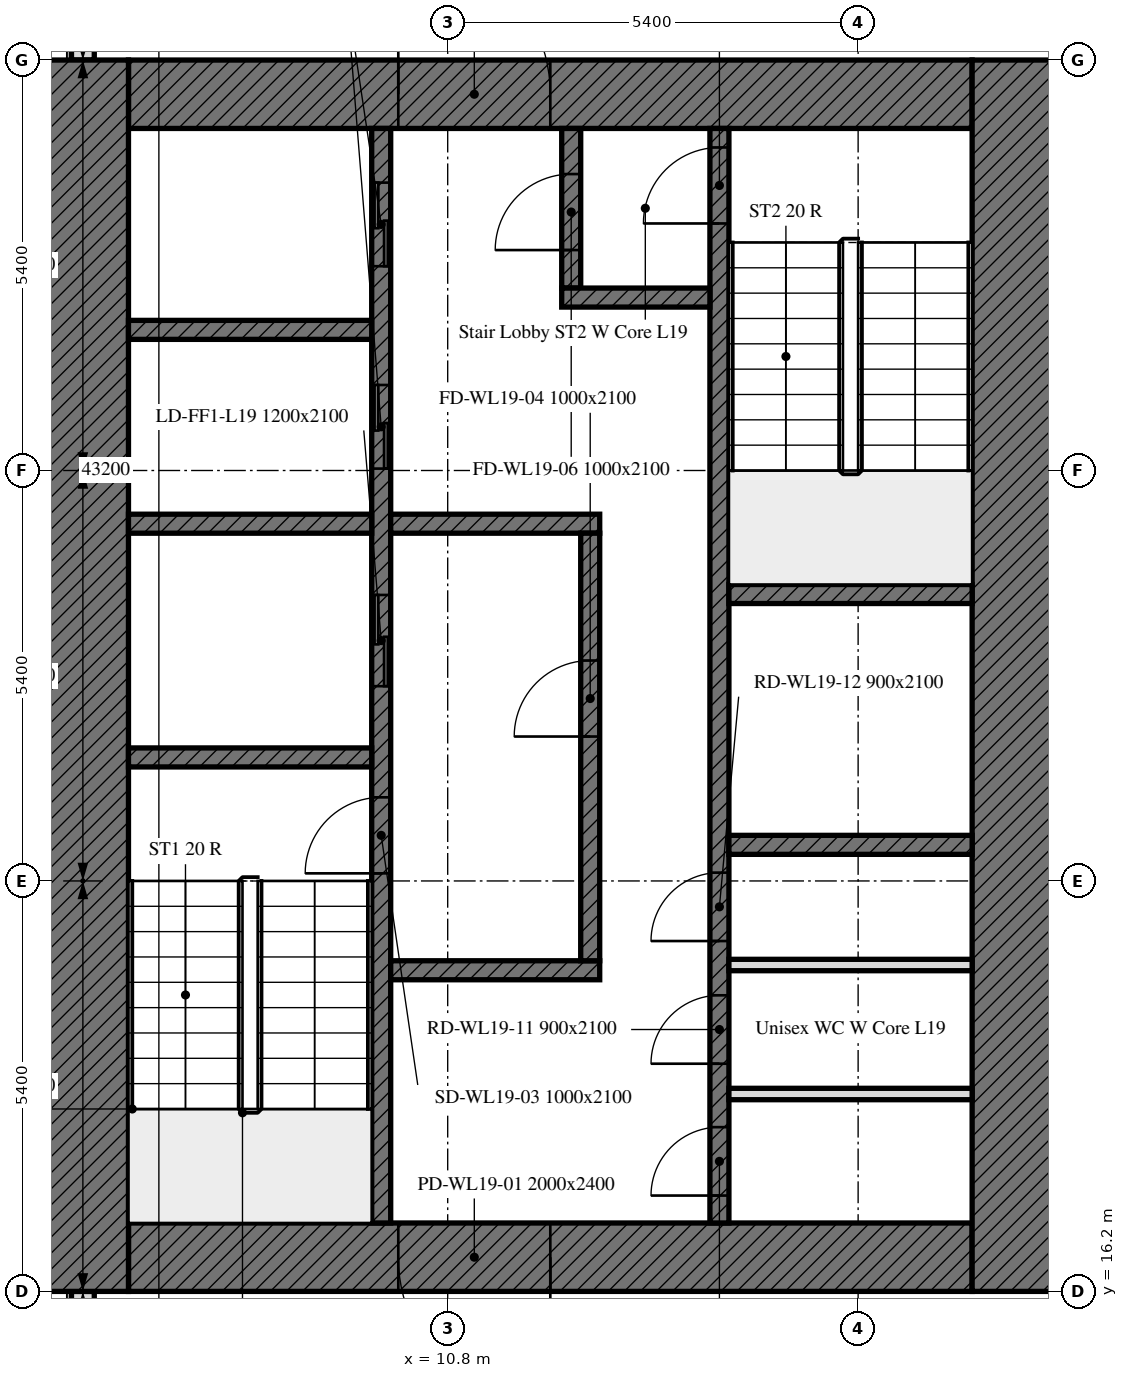
"""IFC4 building model, lengths in metres.
Left out: names, types, materials, properties, quantities, classifications, styles, units other than length and angle.
Written with IfcOpenShell. Run it as: python <this file> out.ifc"""

import sys

from ifc_helpers import new_model, si_unit, direction, frame, frame_2d, origin, place, context, subcontext, project, spatial, rectangle, extrude, element, fill, save


model = new_model("IFC4")
c1 = context("Model", 3, precision=1e-05, world=origin(), true_north=direction((0.0, 1.0)))
c2 = subcontext(c1, "Body", "Model", "MODEL_VIEW")
j1 = project(units=[si_unit("LENGTHUNIT", "METRE"), si_unit("PLANEANGLEUNIT", "RADIAN")], contexts=[c1])
p1 = place(None, origin())
s1 = spatial("IfcSite", under=j1, at=p1, CompositionType="ELEMENT")
p2 = place(p1, origin())
s2 = spatial("IfcBuilding", under=s1, at=p2, CompositionType="ELEMENT")
p3 = place(p2, frame((0.0, 0.0, 84.0)))
s3 = spatial("IfcBuildingStorey", under=s2, at=p3, CompositionType="ELEMENT", Elevation=84.0)
p4 = place(p3, frame((6.0, 43.014, 0.0), z_axis=(0.0, 0.0, 1.0), x_axis=(0.0, -1.0, 0.0)))
e1 = element("IfcWall", 1, at=p4, inside=s3, PredefinedType="SOLIDWALL", context=c2, shape_type="SweptSolid", body=[
    extrude(rectangle(XDim=10.614, YDim=0.3, at=frame_2d((5.307, 0.0))), origin(), (0.0, 0.0, 1.0), 3.5),
])
p5 = place(p4, frame((6.564, 0.0, 0.9)))
e2 = element("IfcOpeningElement", 2, at=p5, cuts=e1, PredefinedType="OPENING", context=c2, shape_type="SweptSolid", body=[
    extrude(rectangle(XDim=1.1, YDim=1.7, at=frame_2d((0.55, 0.85))), frame((0.0, 0.16, 0.0), z_axis=(0.0, -1.0, 0.0), x_axis=(1.0, 0.0, 0.0)), (0.0, 0.0, 1.0), 0.32),
])
p6 = place(p4, frame((8.164, 0.0, 0.9)))
e3 = element("IfcOpeningElement", 3, at=p6, cuts=e1, PredefinedType="OPENING", context=c2, shape_type="SweptSolid", body=[
    extrude(rectangle(XDim=1.1, YDim=1.7, at=frame_2d((0.55, 0.85))), frame((0.0, 0.16, 0.0), z_axis=(0.0, -1.0, 0.0), x_axis=(1.0, 0.0, 0.0)), (0.0, 0.0, 1.0), 0.32),
])
p7 = place(p3, frame((6.0, 16.2, 0.0), z_axis=(0.0, 0.0, 1.0), x_axis=(0.0, -1.0, 0.0)))
e4 = element("IfcWall", 4, at=p7, inside=s3, PredefinedType="SOLIDWALL", context=c2, shape_type="SweptSolid", body=[
    extrude(rectangle(XDim=5.214, YDim=0.3, at=frame_2d((2.607, 0.0))), origin(), (0.0, 0.0, 1.0), 3.5),
])
p8 = place(p7, frame((1.35, 0.0, 0.9)))
e5 = element("IfcOpeningElement", 5, at=p8, cuts=e4, PredefinedType="OPENING", context=c2, shape_type="SweptSolid", body=[
    extrude(rectangle(XDim=1.1, YDim=1.7, at=frame_2d((0.55, 0.85))), frame((0.0, 0.16, 0.0), z_axis=(0.0, -1.0, 0.0), x_axis=(1.0, 0.0, 0.0)), (0.0, 0.0, 1.0), 0.32),
])
p9 = place(p7, frame((2.95, 0.0, 0.9)))
e6 = element("IfcOpeningElement", 6, at=p9, cuts=e4, PredefinedType="OPENING", context=c2, shape_type="SweptSolid", body=[
    extrude(rectangle(XDim=1.1, YDim=1.7, at=frame_2d((0.55, 0.85))), frame((0.0, 0.16, 0.0), z_axis=(0.0, -1.0, 0.0), x_axis=(1.0, 0.0, 0.0)), (0.0, 0.0, 1.0), 0.32),
])
p10 = place(p3, frame((17.7, 16.65, 0.0), z_axis=(0.0, 0.0, 1.0), x_axis=(-1.0, 0.0, 0.0)))
e7 = element("IfcWall", 7, at=p10, inside=s3, PredefinedType="SOLIDWALL", context=c2, shape_type="SweptSolid", body=[
    extrude(rectangle(XDim=11.1, YDim=0.9, at=frame_2d((5.55, 0.0))), origin(), (0.0, 0.0, 1.0), 3.5),
])
p11 = place(p10, frame((5.55, 0.0, 0.0)))
e8 = element("IfcOpeningElement", 8, at=p11, cuts=e7, PredefinedType="OPENING", context=c2, shape_type="SweptSolid", body=[
    extrude(rectangle(XDim=2.0, YDim=2.4, at=frame_2d((1.0, 1.2))), frame((0.0, 0.45, 0.0), z_axis=(0.0, -1.0, 0.0), x_axis=(1.0, 0.0, 0.0)), (0.0, 0.0, 1.0), 0.9),
])
p12 = place(p3, frame((6.6, 31.95, 0.0), z_axis=(0.0, 0.0, 1.0), x_axis=(1.0, 0.0, 0.0)))
e9 = element("IfcWall", 9, at=p12, inside=s3, PredefinedType="SOLIDWALL", context=c2, shape_type="SweptSolid", body=[
    extrude(rectangle(XDim=11.1, YDim=0.9, at=frame_2d((5.55, 0.0))), origin(), (0.0, 0.0, 1.0), 3.5),
])
p13 = place(p12, frame((3.55, 0.0, 0.0)))
e10 = element("IfcOpeningElement", 10, at=p13, cuts=e9, PredefinedType="OPENING", context=c2, shape_type="SweptSolid", body=[
    extrude(rectangle(XDim=2.0, YDim=2.4, at=frame_2d((1.0, 1.2))), frame((0.0, 0.45, 0.0), z_axis=(0.0, -1.0, 0.0), x_axis=(1.0, 0.0, 0.0)), (0.0, 0.0, 1.0), 0.9),
])
for number, where, z_axis, x_axis in (
    (11, (6.0, 16.2, 0.0), (0.0, 0.0, 1.0), (0.0, 1.0, 0.0)),
    (12, (18.3, 32.4, 0.0), (0.0, 0.0, 1.0), (0.0, -1.0, 0.0)),
):
    element("IfcWall", number, at=place(p3, frame(where, z_axis=z_axis, x_axis=x_axis)), inside=s3, PredefinedType="SOLIDWALL", context=c2, shape_type="SweptSolid", body=[
        extrude(rectangle(XDim=16.2, YDim=1.2, at=frame_2d((8.1, 0.0))), origin(), (0.0, 0.0, 1.0), 3.5),
    ])
p14 = place(p3, frame((9.925, 17.1, 0.0), z_axis=(0.0, 0.0, 1.0), x_axis=(0.0, 1.0, 0.0)))
e13 = element("IfcWall", 13, at=p14, inside=s3, PredefinedType="SOLIDWALL", context=c2, shape_type="SweptSolid", body=[
    extrude(rectangle(XDim=14.4, YDim=0.25, at=frame_2d((7.2, 0.0))), origin(), (0.0, 0.0, 1.0), 3.5),
])
p15 = place(p14, frame((4.6, 0.0, 0.0)))
e14 = element("IfcOpeningElement", 14, at=p15, cuts=e13, PredefinedType="OPENING", context=c2, shape_type="SweptSolid", body=[
    extrude(rectangle(XDim=1.0, YDim=2.1, at=frame_2d((0.5, 1.05))), frame((0.0, 0.125, 0.0), z_axis=(0.0, -1.0, 0.0), x_axis=(1.0, 0.0, 0.0)), (0.0, 0.0, 1.0), 0.25),
])
p16 = place(p14, frame((7.062, 0.0, 0.0)))
e15 = element("IfcOpeningElement", 15, at=p16, cuts=e13, PredefinedType="OPENING", context=c2, shape_type="SweptSolid", body=[
    extrude(rectangle(XDim=1.2, YDim=2.1, at=frame_2d((0.6, 1.05))), frame((0.0, 0.125, 0.0), z_axis=(0.0, -1.0, 0.0), x_axis=(1.0, 0.0, 0.0)), (0.0, 0.0, 1.0), 0.25),
])
p17 = place(p14, frame((9.925, 0.0, 0.0)))
e16 = element("IfcOpeningElement", 16, at=p17, cuts=e13, PredefinedType="OPENING", context=c2, shape_type="SweptSolid", body=[
    extrude(rectangle(XDim=1.1, YDim=2.1, at=frame_2d((0.55, 1.05))), frame((0.0, 0.125, 0.0), z_axis=(0.0, -1.0, 0.0), x_axis=(1.0, 0.0, 0.0)), (0.0, 0.0, 1.0), 0.25),
])
p18 = place(p14, frame((12.587, 0.0, 0.0)))
e17 = element("IfcOpeningElement", 17, at=p18, cuts=e13, PredefinedType="OPENING", context=c2, shape_type="SweptSolid", body=[
    extrude(rectangle(XDim=1.1, YDim=2.1, at=frame_2d((0.55, 1.05))), frame((0.0, 0.125, 0.0), z_axis=(0.0, -1.0, 0.0), x_axis=(1.0, 0.0, 0.0)), (0.0, 0.0, 1.0), 0.25),
])
p19 = place(p3, frame((14.375, 17.1, 0.0), z_axis=(0.0, 0.0, 1.0), x_axis=(0.0, 1.0, 0.0)))
e18 = element("IfcWall", 18, at=p19, inside=s3, PredefinedType="SOLIDWALL", context=c2, shape_type="SweptSolid", body=[
    extrude(rectangle(XDim=14.4, YDim=0.25, at=frame_2d((7.2, 0.0))), origin(), (0.0, 0.0, 1.0), 3.5),
])
p20 = place(p19, frame((13.15, 0.0, 0.0)))
e19 = element("IfcOpeningElement", 19, at=p20, cuts=e18, PredefinedType="OPENING", context=c2, shape_type="SweptSolid", body=[
    extrude(rectangle(XDim=1.0, YDim=2.1, at=frame_2d((0.5, 1.05))), frame((0.0, 0.125, 0.0), z_axis=(0.0, -1.0, 0.0), x_axis=(1.0, 0.0, 0.0)), (0.0, 0.0, 1.0), 0.25),
])
p21 = place(p19, frame((0.361, 0.0, 0.0)))
e20 = element("IfcOpeningElement", 20, at=p21, cuts=e18, PredefinedType="OPENING", context=c2, shape_type="SweptSolid", body=[
    extrude(rectangle(XDim=0.9, YDim=2.1, at=frame_2d((0.45, 1.05))), frame((0.0, 0.125, 0.0), z_axis=(0.0, -1.0, 0.0), x_axis=(1.0, 0.0, 0.0)), (0.0, 0.0, 1.0), 0.25),
])
p22 = place(p19, frame((2.095, 0.0, 0.0)))
e21 = element("IfcOpeningElement", 21, at=p22, cuts=e18, PredefinedType="OPENING", context=c2, shape_type="SweptSolid", body=[
    extrude(rectangle(XDim=0.9, YDim=2.1, at=frame_2d((0.45, 1.05))), frame((0.0, 0.125, 0.0), z_axis=(0.0, -1.0, 0.0), x_axis=(1.0, 0.0, 0.0)), (0.0, 0.0, 1.0), 0.25),
])
p23 = place(p19, frame((3.709, 0.0, 0.0)))
e22 = element("IfcOpeningElement", 22, at=p23, cuts=e18, PredefinedType="OPENING", context=c2, shape_type="SweptSolid", body=[
    extrude(rectangle(XDim=0.9, YDim=2.1, at=frame_2d((0.45, 1.05))), frame((0.0, 0.125, 0.0), z_axis=(0.0, -1.0, 0.0), x_axis=(1.0, 0.0, 0.0)), (0.0, 0.0, 1.0), 0.25),
])
for number, where, z_axis, x_axis in (
    (23, (6.6, 23.225, 0.0), (0.0, 0.0, 1.0), (1.0, 0.0, 0.0)),
    (24, (14.5, 25.375, 0.0), (0.0, 0.0, 1.0), (1.0, 0.0, 0.0)),
    (25, (14.5, 22.075, 0.0), (0.0, 0.0, 1.0), (1.0, 0.0, 0.0)),
    (26, (6.6, 26.3, 0.0), (0.0, 0.0, 1.0), (1.0, 0.0, 0.0)),
):
    element("IfcWall", number, at=place(p3, frame(where, z_axis=z_axis, x_axis=x_axis)), inside=s3, PredefinedType="SOLIDWALL", context=c2, shape_type="SweptSolid", body=[
        extrude(rectangle(XDim=3.2, YDim=0.25, at=frame_2d((1.6, 0.0))), origin(), (0.0, 0.0, 1.0), 3.5),
    ])
for number, where, z_axis, x_axis in (
    (27, (10.05, 26.3, 0.0), (0.0, 0.0, 1.0), (1.0, 0.0, 0.0)),
    (28, (10.05, 20.425, 0.0), (0.0, 0.0, 1.0), (1.0, 0.0, 0.0)),
):
    element("IfcWall", number, at=place(p3, frame(where, z_axis=z_axis, x_axis=x_axis)), inside=s3, PredefinedType="SOLIDWALL", context=c2, shape_type="SweptSolid", body=[
        extrude(rectangle(XDim=2.75, YDim=0.25, at=frame_2d((1.375, 0.0))), origin(), (0.0, 0.0, 1.0), 3.5),
    ])
p24 = place(p3, frame((12.425, 29.4, 0.0), z_axis=(0.0, 0.0, 1.0), x_axis=(0.0, 1.0, 0.0)))
e29 = element("IfcWall", 29, at=p24, inside=s3, PredefinedType="SOLIDWALL", context=c2, shape_type="SweptSolid", body=[
    extrude(rectangle(XDim=2.1, YDim=0.25, at=frame_2d((1.05, 0.0))), origin(), (0.0, 0.0, 1.0), 3.5),
])
p25 = place(p24, frame((0.5, 0.0, 0.0)))
e30 = element("IfcOpeningElement", 30, at=p25, cuts=e29, PredefinedType="OPENING", context=c2, shape_type="SweptSolid", body=[
    extrude(rectangle(XDim=1.0, YDim=2.1, at=frame_2d((0.5, 1.05))), frame((0.0, 0.125, 0.0), z_axis=(0.0, -1.0, 0.0), x_axis=(1.0, 0.0, 0.0)), (0.0, 0.0, 1.0), 0.25),
])
p26 = place(p3, frame((12.3, 29.275, 0.0), z_axis=(0.0, 0.0, 1.0), x_axis=(1.0, 0.0, 0.0)))
e31 = element("IfcWall", 31, at=p26, inside=s3, PredefinedType="SOLIDWALL", context=c2, shape_type="SweptSolid", body=[
    extrude(rectangle(XDim=1.95, YDim=0.25, at=frame_2d((0.975, 0.0))), origin(), (0.0, 0.0, 1.0), 3.5),
])
p27 = place(p3, frame((12.675, 20.55, 0.0), z_axis=(0.0, 0.0, 1.0), x_axis=(0.0, 1.0, 0.0)))
e32 = element("IfcWall", 32, at=p27, inside=s3, PredefinedType="SOLIDWALL", context=c2, shape_type="SweptSolid", body=[
    extrude(rectangle(XDim=5.625, YDim=0.25, at=frame_2d((2.812, 0.0))), origin(), (0.0, 0.0, 1.0), 3.5),
])
p28 = place(p27, frame((2.95, 0.0, 0.0)))
e33 = element("IfcOpeningElement", 33, at=p28, cuts=e32, PredefinedType="OPENING", context=c2, shape_type="SweptSolid", body=[
    extrude(rectangle(XDim=1.0, YDim=2.1, at=frame_2d((0.5, 1.05))), frame((0.0, 0.125, 0.0), z_axis=(0.0, -1.0, 0.0), x_axis=(1.0, 0.0, 0.0)), (0.0, 0.0, 1.0), 0.25),
])
p29 = place(p3, frame((6.6, 28.85, 0.0), z_axis=(0.0, 0.0, 1.0), x_axis=(1.0, 0.0, 0.0)))
e34 = element("IfcWall", 34, at=p29, inside=s3, PredefinedType="SOLIDWALL", context=c2, shape_type="SweptSolid", body=[
    extrude(rectangle(XDim=3.2, YDim=0.25, at=frame_2d((1.6, 0.0))), origin(), (0.0, 0.0, 1.0), 3.5),
])
for number, where, z_axis, x_axis in (
    (35, (14.5, 18.797, 0.0), (0.0, 0.0, 1.0), (1.0, 0.0, 0.0)),
    (36, (14.5, 20.494, 0.0), (0.0, 0.0, 1.0), (1.0, 0.0, 0.0)),
):
    element("IfcWall", number, at=place(p3, frame(where, z_axis=z_axis, x_axis=x_axis)), inside=s3, PredefinedType="PARTITIONING", context=c2, shape_type="SweptSolid", body=[
        extrude(rectangle(XDim=3.2, YDim=0.15, at=frame_2d((1.6, 0.0))), origin(), (0.0, 0.0, 1.0), 3.5),
    ])
p30 = place(p11, origin())
e37 = element("IfcDoor", 37, at=p30, inside=s3, OperationType="DOUBLE_DOOR_SINGLE_SWING", PredefinedType="DOOR", context=c2, shape_type="SweptSolid", body=[
    extrude(rectangle(XDim=2.0, YDim=2.4, at=frame_2d((1.0, 1.2))), frame((0.0, 0.025, 0.0), z_axis=(0.0, -1.0, 0.0), x_axis=(1.0, 0.0, 0.0)), (0.0, 0.0, 1.0), 0.05),
])
fill(e8, e37)
p31 = place(p13, origin())
e38 = element("IfcDoor", 38, at=p31, inside=s3, OperationType="DOUBLE_DOOR_SINGLE_SWING", PredefinedType="DOOR", context=c2, shape_type="SweptSolid", body=[
    extrude(rectangle(XDim=2.0, YDim=2.4, at=frame_2d((1.0, 1.2))), frame((0.0, 0.025, 0.0), z_axis=(0.0, -1.0, 0.0), x_axis=(1.0, 0.0, 0.0)), (0.0, 0.0, 1.0), 0.05),
])
fill(e10, e38)
p32 = place(p15, origin())
e39 = element("IfcDoor", 39, at=p32, inside=s3, OperationType="SINGLE_SWING_LEFT", PredefinedType="DOOR", context=c2, shape_type="SweptSolid", body=[
    extrude(rectangle(XDim=1.0, YDim=2.1, at=frame_2d((0.5, 1.05))), frame((0.0, 0.025, 0.0), z_axis=(0.0, -1.0, 0.0), x_axis=(1.0, 0.0, 0.0)), (0.0, 0.0, 1.0), 0.05),
])
fill(e14, e39)
p33 = place(p28, origin())
e40 = element("IfcDoor", 40, at=p33, inside=s3, OperationType="SINGLE_SWING_LEFT", PredefinedType="DOOR", context=c2, shape_type="SweptSolid", body=[
    extrude(rectangle(XDim=1.0, YDim=2.1, at=frame_2d((0.5, 1.05))), frame((0.0, 0.025, 0.0), z_axis=(0.0, -1.0, 0.0), x_axis=(1.0, 0.0, 0.0)), (0.0, 0.0, 1.0), 0.05),
])
fill(e33, e40)
p34 = place(p20, origin())
e41 = element("IfcDoor", 41, at=p34, inside=s3, OperationType="SINGLE_SWING_LEFT", PredefinedType="DOOR", context=c2, shape_type="SweptSolid", body=[
    extrude(rectangle(XDim=1.0, YDim=2.1, at=frame_2d((0.5, 1.05))), frame((0.0, 0.025, 0.0), z_axis=(0.0, -1.0, 0.0), x_axis=(1.0, 0.0, 0.0)), (0.0, 0.0, 1.0), 0.05),
])
fill(e19, e41)
p35 = place(p25, origin())
e42 = element("IfcDoor", 42, at=p35, inside=s3, OperationType="SINGLE_SWING_LEFT", PredefinedType="DOOR", context=c2, shape_type="SweptSolid", body=[
    extrude(rectangle(XDim=1.0, YDim=2.1, at=frame_2d((0.5, 1.05))), frame((0.0, 0.025, 0.0), z_axis=(0.0, -1.0, 0.0), x_axis=(1.0, 0.0, 0.0)), (0.0, 0.0, 1.0), 0.05),
])
fill(e30, e42)
p36 = place(p16, origin())
e43 = element("IfcDoor", 43, at=p36, inside=s3, OperationType="DOUBLE_DOOR_SLIDING", PredefinedType="DOOR", context=c2, shape_type="SweptSolid", body=[
    extrude(rectangle(XDim=1.2, YDim=2.1, at=frame_2d((0.6, 1.05))), frame((0.0, 0.025, 0.0), z_axis=(0.0, -1.0, 0.0), x_axis=(1.0, 0.0, 0.0)), (0.0, 0.0, 1.0), 0.05),
])
fill(e15, e43)
p37 = place(p17, origin())
e44 = element("IfcDoor", 44, at=p37, inside=s3, OperationType="DOUBLE_DOOR_SLIDING", PredefinedType="DOOR", context=c2, shape_type="SweptSolid", body=[
    extrude(rectangle(XDim=1.1, YDim=2.1, at=frame_2d((0.55, 1.05))), frame((0.0, 0.025, 0.0), z_axis=(0.0, -1.0, 0.0), x_axis=(1.0, 0.0, 0.0)), (0.0, 0.0, 1.0), 0.05),
])
fill(e16, e44)
p38 = place(p18, origin())
e45 = element("IfcDoor", 45, at=p38, inside=s3, OperationType="DOUBLE_DOOR_SLIDING", PredefinedType="DOOR", context=c2, shape_type="SweptSolid", body=[
    extrude(rectangle(XDim=1.1, YDim=2.1, at=frame_2d((0.55, 1.05))), frame((0.0, 0.025, 0.0), z_axis=(0.0, -1.0, 0.0), x_axis=(1.0, 0.0, 0.0)), (0.0, 0.0, 1.0), 0.05),
])
fill(e17, e45)
p39 = place(p21, origin())
e46 = element("IfcDoor", 46, at=p39, inside=s3, OperationType="SINGLE_SWING_LEFT", PredefinedType="DOOR", context=c2, shape_type="SweptSolid", body=[
    extrude(rectangle(XDim=0.9, YDim=2.1, at=frame_2d((0.45, 1.05))), frame((0.0, 0.025, 0.0), z_axis=(0.0, -1.0, 0.0), x_axis=(1.0, 0.0, 0.0)), (0.0, 0.0, 1.0), 0.05),
])
fill(e20, e46)
p40 = place(p22, origin())
e47 = element("IfcDoor", 47, at=p40, inside=s3, OperationType="SINGLE_SWING_LEFT", PredefinedType="DOOR", context=c2, shape_type="SweptSolid", body=[
    extrude(rectangle(XDim=0.9, YDim=2.1, at=frame_2d((0.45, 1.05))), frame((0.0, 0.025, 0.0), z_axis=(0.0, -1.0, 0.0), x_axis=(1.0, 0.0, 0.0)), (0.0, 0.0, 1.0), 0.05),
])
fill(e21, e47)
p41 = place(p23, origin())
e48 = element("IfcDoor", 48, at=p41, inside=s3, OperationType="SINGLE_SWING_LEFT", PredefinedType="DOOR", context=c2, shape_type="SweptSolid", body=[
    extrude(rectangle(XDim=0.9, YDim=2.1, at=frame_2d((0.45, 1.05))), frame((0.0, 0.025, 0.0), z_axis=(0.0, -1.0, 0.0), x_axis=(1.0, 0.0, 0.0)), (0.0, 0.0, 1.0), 0.05),
])
fill(e22, e48)
save(model, sys.argv[1])
